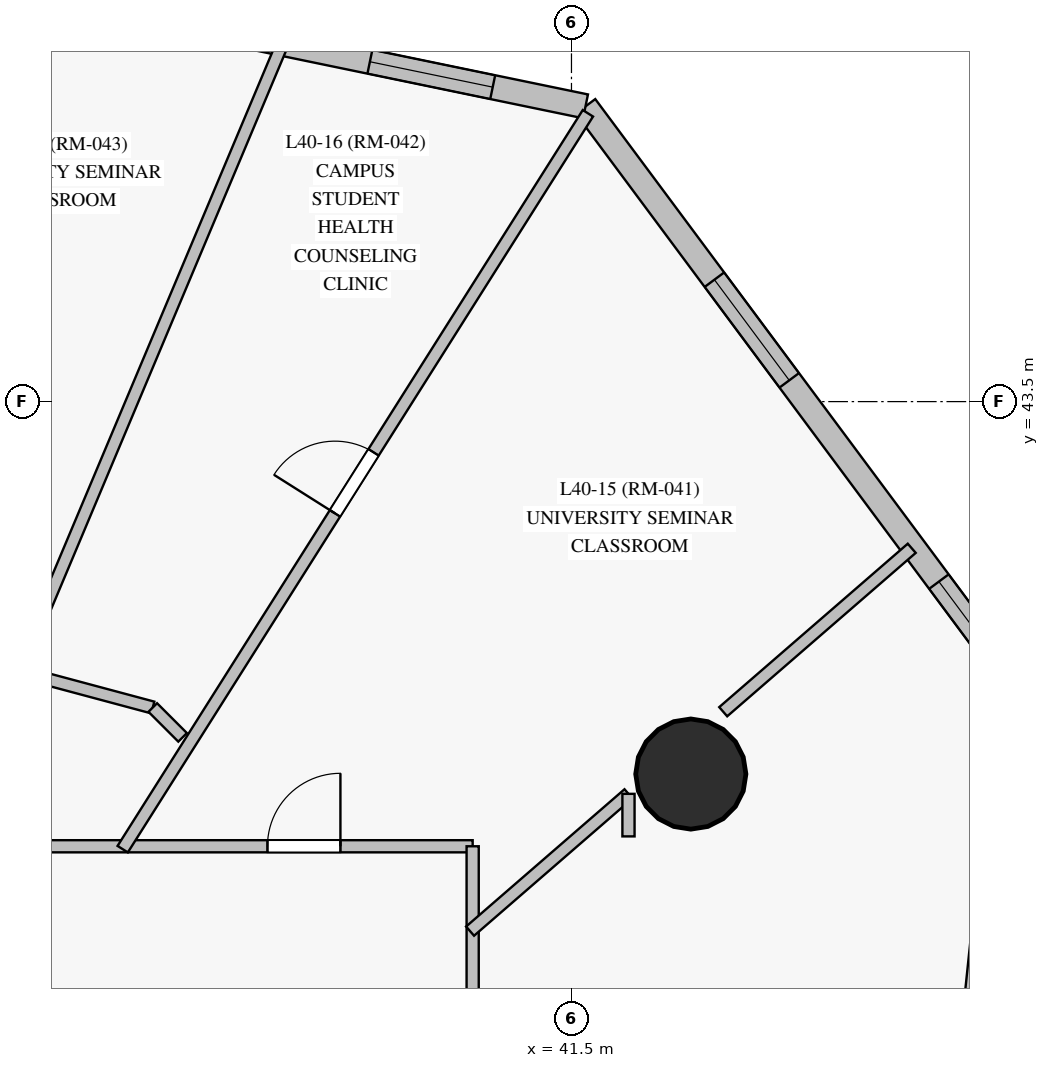
"""IFC4 building model, lengths in metres.
Left out: names, types, materials, properties, quantities, classifications, styles, units other than length and angle.
Written with IfcOpenShell. Run it as: python <this file> out.ifc"""

import sys

from ifc_helpers import new_model, si_unit, direction, frame, frame_2d, origin, origin_with_axes, origin_2d, place, context, subcontext, project, spatial, rectangle, circle, extrude, source, transform, mapped, element, fill, save


model = new_model("IFC4")
c1 = context("Model", 3, precision=1e-05, world=origin(), true_north=direction((0.0, 1.0)))
c2 = subcontext(c1, "Body", "Model", "MODEL_VIEW")
j1 = project(units=[si_unit("LENGTHUNIT", "METRE"), si_unit("PLANEANGLEUNIT", "RADIAN")], contexts=[c1])
p1 = place(None, origin())
s1 = spatial("IfcSite", under=j1, at=p1, CompositionType="ELEMENT")
p2 = place(p1, origin())
s2 = spatial("IfcBuilding", under=s1, at=p2, CompositionType="ELEMENT")
p3 = place(p2, frame((0.0, 0.0, 141.95)))
s3 = spatial("IfcBuildingStorey", under=s2, at=p3, CompositionType="ELEMENT", Elevation=141.95)
m1 = source(origin_with_axes(), c2, "Body", "SweptSolid", [
    extrude(circle(Radius=0.725, at=origin_2d()), origin(), (0.0, 0.0, 1.0), 3.05),
])
p4 = place(p3, frame((43.07, 38.6, 0.0), z_axis=(0.0, 0.0, 1.0), x_axis=(1.0, 0.0, 0.0)))
e1 = element("IfcColumn", 1, at=p4, inside=s3, PredefinedType="COLUMN", context=c2, shape_type="MappedRepresentation", body=[
    mapped(m1, transform((0.0, 0.0, 0.0), scale=1.0)),
])
p5 = place(p3, frame((45.819, 25.995, 0.0), z_axis=(0.0, 0.0, 1.0), x_axis=(0.104139122077, 0.994562739727, 0.0)))
e2 = element("IfcWall", 2, at=p5, inside=s3, PredefinedType="SOLIDWALL", context=c2, shape_type="SweptSolid", body=[
    extrude(rectangle(XDim=13.951, YDim=0.32, at=frame_2d((6.976, 0.0))), origin(), (0.0, 0.0, 1.0), 2.825),
])
p6 = place(p5, frame((2.014, 0.0, 0.85)))
e3 = element("IfcOpeningElement", 3, at=p6, cuts=e2, PredefinedType="OPENING", context=c2, shape_type="SweptSolid", body=[
    extrude(rectangle(XDim=1.65, YDim=1.65, at=frame_2d((0.825, 0.825))), frame((0.0, 0.17, 0.0), z_axis=(0.0, -1.0, 0.0), x_axis=(1.0, 0.0, 0.0)), (0.0, 0.0, 1.0), 0.34),
])
p7 = place(p5, frame((7.021, 0.0, 0.85)))
e4 = element("IfcOpeningElement", 4, at=p7, cuts=e2, PredefinedType="OPENING", context=c2, shape_type="SweptSolid", body=[
    extrude(rectangle(XDim=1.65, YDim=1.65, at=frame_2d((0.825, 0.825))), frame((0.0, 0.17, 0.0), z_axis=(0.0, -1.0, 0.0), x_axis=(1.0, 0.0, 0.0)), (0.0, 0.0, 1.0), 0.34),
])
p8 = place(p5, frame((10.838, 0.0, 0.85)))
e5 = element("IfcOpeningElement", 5, at=p8, cuts=e2, PredefinedType="OPENING", context=c2, shape_type="SweptSolid", body=[
    extrude(rectangle(XDim=1.65, YDim=1.65, at=frame_2d((0.825, 0.825))), frame((0.0, 0.17, 0.0), z_axis=(0.0, -1.0, 0.0), x_axis=(1.0, 0.0, 0.0)), (0.0, 0.0, 1.0), 0.34),
])
p9 = place(p3, frame((47.272, 39.87, 0.0), z_axis=(0.0, 0.0, 1.0), x_axis=(-0.596716111469, 0.802452417476, 0.0)))
e6 = element("IfcWall", 6, at=p9, inside=s3, PredefinedType="SOLIDWALL", context=c2, shape_type="SweptSolid", body=[
    extrude(rectangle(XDim=9.364, YDim=0.32, at=frame_2d((4.682, 0.0))), origin(), (0.0, 0.0, 1.0), 2.825),
])
p10 = place(p9, frame((0.622, 0.0, 0.85)))
e7 = element("IfcOpeningElement", 7, at=p10, cuts=e6, PredefinedType="OPENING", context=c2, shape_type="SweptSolid", body=[
    extrude(rectangle(XDim=0.95, YDim=1.5, at=frame_2d((0.475, 0.75))), frame((0.0, 0.17, 0.0), z_axis=(0.0, -1.0, 0.0), x_axis=(1.0, 0.0, 0.0)), (0.0, 0.0, 1.0), 0.34),
])
p11 = place(p9, frame((4.872, 0.0, 0.85)))
e8 = element("IfcOpeningElement", 8, at=p11, cuts=e6, PredefinedType="OPENING", context=c2, shape_type="SweptSolid", body=[
    extrude(rectangle(XDim=1.65, YDim=1.65, at=frame_2d((0.825, 0.825))), frame((0.0, 0.17, 0.0), z_axis=(0.0, -1.0, 0.0), x_axis=(1.0, 0.0, 0.0)), (0.0, 0.0, 1.0), 0.34),
])
p12 = place(p3, frame((41.685, 47.385, 0.0), z_axis=(0.0, 0.0, 1.0), x_axis=(-0.979267413352, 0.202571797512, 0.0)))
e9 = element("IfcWall", 9, at=p12, inside=s3, PredefinedType="SOLIDWALL", context=c2, shape_type="SweptSolid", body=[
    extrude(rectangle(XDim=11.701, YDim=0.32, at=frame_2d((5.851, 0.0))), origin(), (0.0, 0.0, 1.0), 2.825),
])
p13 = place(p12, frame((1.247, 0.0, 0.85)))
e10 = element("IfcOpeningElement", 10, at=p13, cuts=e9, PredefinedType="OPENING", context=c2, shape_type="SweptSolid", body=[
    extrude(rectangle(XDim=1.65, YDim=1.65, at=frame_2d((0.825, 0.825))), frame((0.0, 0.17, 0.0), z_axis=(0.0, -1.0, 0.0), x_axis=(1.0, 0.0, 0.0)), (0.0, 0.0, 1.0), 0.34),
])
p14 = place(p12, frame((5.496, 0.0, 0.85)))
e11 = element("IfcOpeningElement", 11, at=p14, cuts=e9, PredefinedType="OPENING", context=c2, shape_type="SweptSolid", body=[
    extrude(rectangle(XDim=1.65, YDim=1.65, at=frame_2d((0.825, 0.825))), frame((0.0, 0.17, 0.0), z_axis=(0.0, -1.0, 0.0), x_axis=(1.0, 0.0, 0.0)), (0.0, 0.0, 1.0), 0.34),
])
p15 = place(p12, frame((9.275, 0.0, 0.85)))
e12 = element("IfcOpeningElement", 12, at=p15, cuts=e9, PredefinedType="OPENING", context=c2, shape_type="SweptSolid", body=[
    extrude(rectangle(XDim=1.65, YDim=1.65, at=frame_2d((0.825, 0.825))), frame((0.0, 0.17, 0.0), z_axis=(0.0, -1.0, 0.0), x_axis=(1.0, 0.0, 0.0)), (0.0, 0.0, 1.0), 0.34),
])
p16 = place(p3, frame((16.7, 37.65, 0.0), z_axis=(0.0, 0.0, 1.0), x_axis=(1.0, 0.0, 0.0)))
e13 = element("IfcWall", 13, at=p16, inside=s3, PredefinedType="PARTITIONING", context=c2, shape_type="SweptSolid", body=[
    extrude(rectangle(XDim=23.5, YDim=0.16, at=frame_2d((11.75, 0.0))), origin(), (0.0, 0.0, 1.0), 2.325),
])
p17 = place(p16, frame((20.8, 0.0, 0.0)))
e14 = element("IfcOpeningElement", 14, at=p17, cuts=e13, PredefinedType="OPENING", context=c2, shape_type="SweptSolid", body=[
    extrude(rectangle(XDim=0.96, YDim=2.15, at=frame_2d((0.48, 1.075))), frame((0.0, 0.09, 0.0), z_axis=(0.0, -1.0, 0.0), x_axis=(1.0, 0.0, 0.0)), (0.0, 0.0, 1.0), 0.18),
])
p18 = place(p16, frame((11.275, 0.0, 0.0)))
e15 = element("IfcOpeningElement", 15, at=p18, cuts=e13, PredefinedType="OPENING", context=c2, shape_type="SweptSolid", body=[
    extrude(rectangle(XDim=0.96, YDim=2.15, at=frame_2d((0.48, 1.075))), frame((0.0, 0.09, 0.0), z_axis=(0.0, -1.0, 0.0), x_axis=(1.0, 0.0, 0.0)), (0.0, 0.0, 1.0), 0.18),
])
p19 = place(p16, frame((7.75, 0.0, 0.0)))
e16 = element("IfcOpeningElement", 16, at=p19, cuts=e13, PredefinedType="OPENING", context=c2, shape_type="SweptSolid", body=[
    extrude(rectangle(XDim=0.96, YDim=2.15, at=frame_2d((0.48, 1.075))), frame((0.0, 0.09, 0.0), z_axis=(0.0, -1.0, 0.0), x_axis=(1.0, 0.0, 0.0)), (0.0, 0.0, 1.0), 0.18),
])
p20 = place(p3, frame((40.2, 37.65, 0.0), z_axis=(0.0, 0.0, 1.0), x_axis=(0.0, -1.0, 0.0)))
e17 = element("IfcWall", 17, at=p20, inside=s3, PredefinedType="PARTITIONING", context=c2, shape_type="SweptSolid", body=[
    extrude(rectangle(XDim=22.3, YDim=0.16, at=frame_2d((11.15, 0.0))), origin(), (0.0, 0.0, 1.0), 2.325),
])
p21 = place(p20, frame((14.02, 0.0, 0.0)))
e18 = element("IfcOpeningElement", 18, at=p21, cuts=e17, PredefinedType="OPENING", context=c2, shape_type="SweptSolid", body=[
    extrude(rectangle(XDim=0.96, YDim=2.15, at=frame_2d((0.48, 1.075))), frame((0.0, 0.09, 0.0), z_axis=(0.0, -1.0, 0.0), x_axis=(1.0, 0.0, 0.0)), (0.0, 0.0, 1.0), 0.18),
])
p22 = place(p20, frame((10.675, 0.0, 0.0)))
e19 = element("IfcOpeningElement", 19, at=p22, cuts=e17, PredefinedType="OPENING", context=c2, shape_type="SweptSolid", body=[
    extrude(rectangle(XDim=0.95, YDim=2.15, at=frame_2d((0.475, 1.075))), frame((0.0, 0.09, 0.0), z_axis=(0.0, -1.0, 0.0), x_axis=(1.0, 0.0, 0.0)), (0.0, 0.0, 1.0), 0.18),
])
p23 = place(p20, frame((5.1, 0.0, 0.0)))
e20 = element("IfcOpeningElement", 20, at=p23, cuts=e17, PredefinedType="OPENING", context=c2, shape_type="SweptSolid", body=[
    extrude(rectangle(XDim=0.96, YDim=2.15, at=frame_2d((0.48, 1.075))), frame((0.0, 0.09, 0.0), z_axis=(0.0, -1.0, 0.0), x_axis=(1.0, 0.0, 0.0)), (0.0, 0.0, 1.0), 0.18),
])
p24 = place(p3, frame((35.596, 37.612, 0.0), z_axis=(0.0, 0.0, 1.0), x_axis=(0.53436425584, 0.845254306159, 0.0)))
e21 = element("IfcWall", 21, at=p24, inside=s3, PredefinedType="PARTITIONING", context=c2, shape_type="SweptSolid", body=[
    extrude(rectangle(XDim=11.454, YDim=0.16, at=frame_2d((5.727, 0.0))), origin(), (0.0, 0.0, 1.0), 2.825),
])
p25 = place(p24, frame((5.227, 0.0, 0.0)))
e22 = element("IfcOpeningElement", 22, at=p25, cuts=e21, PredefinedType="OPENING", context=c2, shape_type="SweptSolid", body=[
    extrude(rectangle(XDim=0.95, YDim=2.15, at=frame_2d((0.475, 1.075))), frame((0.0, 0.09, 0.0), z_axis=(0.0, -1.0, 0.0), x_axis=(1.0, 0.0, 0.0)), (0.0, 0.0, 1.0), 0.18),
])
p26 = place(p3, frame((34.223, 39.949, 0.0), z_axis=(0.0, 0.0, 1.0), x_axis=(0.387756457324, 0.921761861765, 0.0)))
e23 = element("IfcWall", 23, at=p26, inside=s3, PredefinedType="PARTITIONING", context=c2, shape_type="SweptSolid", body=[
    extrude(rectangle(XDim=8.934, YDim=0.16, at=frame_2d((4.467, 0.0))), origin(), (0.0, 0.0, 1.0), 2.825),
])
p27 = place(p3, frame((43.496, 39.42, 0.0), z_axis=(0.0, 0.0, 1.0), x_axis=(0.755622829895, 0.655006976254, 0.0)))
e24 = element("IfcWall", 24, at=p27, inside=s3, PredefinedType="PARTITIONING", context=c2, shape_type="SweptSolid", body=[
    extrude(rectangle(XDim=3.283, YDim=0.16, at=frame_2d((1.642, 0.0))), origin(), (0.0, 0.0, 1.0), 2.825),
])
p28 = place(p3, frame((40.166, 36.533, 0.0), z_axis=(0.0, 0.0, 1.0), x_axis=(0.755595613728, 0.655038371788, 0.0)))
e25 = element("IfcWall", 25, at=p28, inside=s3, PredefinedType="PARTITIONING", context=c2, shape_type="SweptSolid", body=[
    extrude(rectangle(XDim=2.758, YDim=0.16, at=frame_2d((1.379, 0.0))), origin(), (0.0, 0.0, 1.0), 2.225),
])
p29 = place(p3, frame((35.991, 39.476, 0.0), z_axis=(0.0, 0.0, 1.0), x_axis=(-0.965926624666, 0.258816065499, 0.0)))
e26 = element("IfcWall", 26, at=p29, inside=s3, PredefinedType="PARTITIONING", context=c2, shape_type="SweptSolid", body=[
    extrude(rectangle(XDim=1.831, YDim=0.16, at=frame_2d((0.916, 0.0))), origin(), (0.0, 0.0, 1.0), 2.325),
])
p30 = place(p3, frame((42.25, 38.34, 0.0), z_axis=(0.0, 0.0, 1.0), x_axis=(0.0, -1.0, 0.0)))
e27 = element("IfcWall", 27, at=p30, inside=s3, PredefinedType="PARTITIONING", context=c2, shape_type="SweptSolid", body=[
    extrude(rectangle(XDim=0.56, YDim=0.16, at=frame_2d((0.28, 0.0))), origin(), (0.0, 0.0, 1.0), 2.325),
])
p31 = place(p3, frame((36.384, 39.083, 0.0), z_axis=(0.0, 0.0, 1.0), x_axis=(-0.706886807091, 0.707326686871, 0.0)))
e28 = element("IfcWall", 28, at=p31, inside=s3, PredefinedType="PARTITIONING", context=c2, shape_type="SweptSolid", body=[
    extrude(rectangle(XDim=0.555, YDim=0.16, at=frame_2d((0.277, 0.0))), origin(), (0.0, 0.0, 1.0), 2.325),
])
m2 = source(origin_with_axes(), c2, "Body", "SweptSolid", [
    extrude(rectangle(XDim=0.95, YDim=1.5, at=frame_2d((0.475, 0.75))), frame((0.0, 0.03, 0.0), z_axis=(0.0, -1.0, 0.0), x_axis=(1.0, 0.0, 0.0)), (0.0, 0.0, 1.0), 0.06),
])
p32 = place(p10, origin())
e29 = element("IfcWindow", 29, at=p32, inside=s3, PartitioningType="SINGLE_PANEL", PredefinedType="WINDOW", context=c2, shape_type="MappedRepresentation", body=[
    mapped(m2, transform((0.0, 0.0, 0.0), scale=1.0)),
])
fill(e7, e29)
m3 = source(origin_with_axes(), c2, "Body", "SweptSolid", [
    extrude(rectangle(XDim=1.65, YDim=1.65, at=frame_2d((0.825, 0.825))), frame((0.0, 0.03, 0.0), z_axis=(0.0, -1.0, 0.0), x_axis=(1.0, 0.0, 0.0)), (0.0, 0.0, 1.0), 0.06),
])
p33 = place(p11, origin())
e30 = element("IfcWindow", 30, at=p33, inside=s3, PartitioningType="SINGLE_PANEL", PredefinedType="WINDOW", context=c2, shape_type="MappedRepresentation", body=[
    mapped(m3, transform((0.0, 0.0, 0.0), scale=1.0)),
])
fill(e8, e30)
p34 = place(p13, origin())
e31 = element("IfcWindow", 31, at=p34, inside=s3, PartitioningType="SINGLE_PANEL", PredefinedType="WINDOW", context=c2, shape_type="MappedRepresentation", body=[
    mapped(m3, transform((0.0, 0.0, 0.0), scale=1.0)),
])
fill(e10, e31)
m4 = source(origin_with_axes(), c2, "Body", "SweptSolid", [
    extrude(rectangle(XDim=0.96, YDim=2.15, at=frame_2d((0.48, 1.075))), frame((0.0, 0.025, 0.0), z_axis=(0.0, -1.0, 0.0), x_axis=(1.0, 0.0, 0.0)), (0.0, 0.0, 1.0), 0.05),
])
p35 = place(p17, origin())
e32 = element("IfcDoor", 32, at=p35, inside=s3, OperationType="SINGLE_SWING_RIGHT", PredefinedType="DOOR", context=c2, shape_type="MappedRepresentation", body=[
    mapped(m4, transform((0.0, 0.0, 0.0), scale=1.0)),
])
fill(e14, e32)
m5 = source(origin_with_axes(), c2, "Body", "SweptSolid", [
    extrude(rectangle(XDim=0.95, YDim=2.15, at=frame_2d((0.475, 1.075))), frame((0.0, 0.025, 0.0), z_axis=(0.0, -1.0, 0.0), x_axis=(1.0, 0.0, 0.0)), (0.0, 0.0, 1.0), 0.05),
])
p36 = place(p25, origin())
e33 = element("IfcDoor", 33, at=p36, inside=s3, OperationType="SINGLE_SWING_LEFT", PredefinedType="DOOR", context=c2, shape_type="MappedRepresentation", body=[
    mapped(m5, transform((0.0, 0.0, 0.0), scale=1.0)),
])
fill(e22, e33)
save(model, sys.argv[1])
